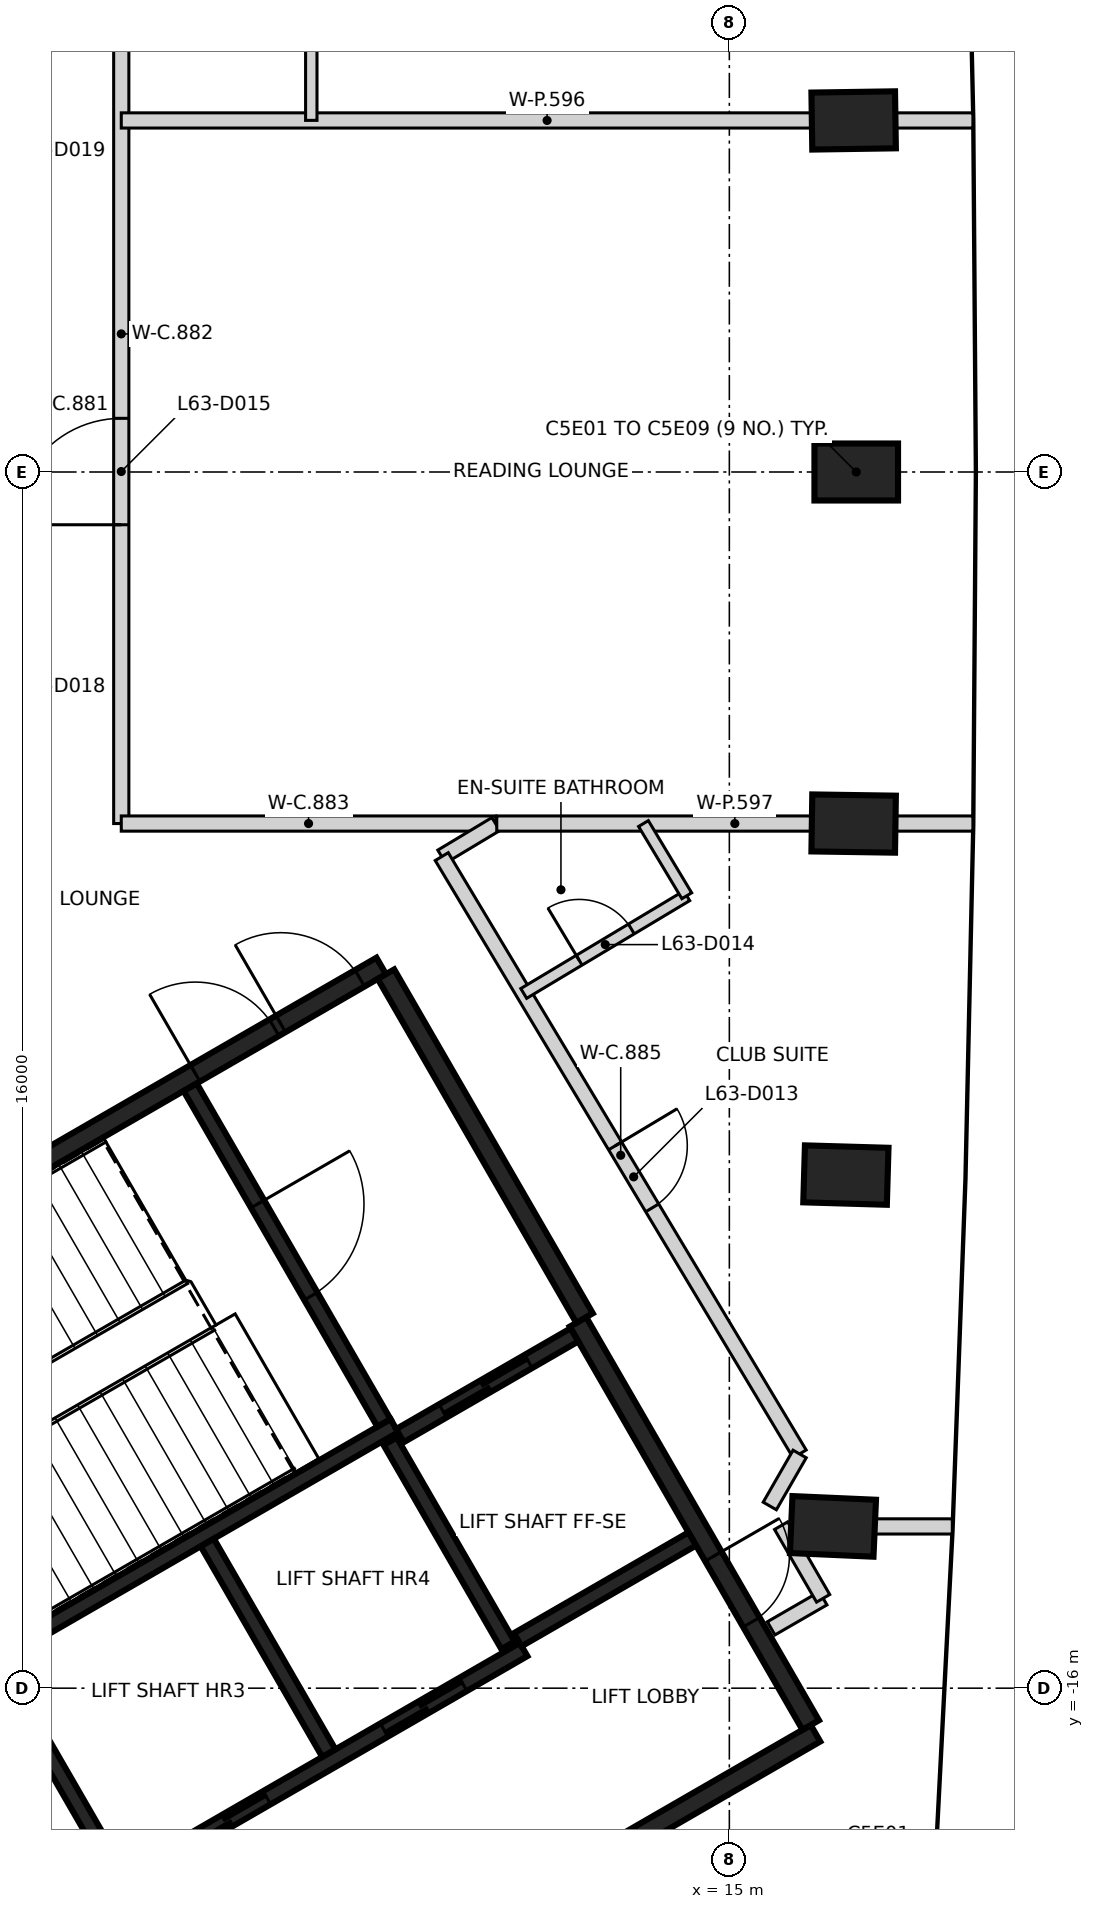
"""IFC4 building model, lengths in metres.
Left out: names, types, materials, properties, quantities, classifications, styles, units other than length and angle.
Written with IfcOpenShell. Run it as: python <this file> out.ifc"""

import sys

from ifc_helpers import new_model, si_unit, direction, frame, frame_2d, origin, origin_2d, place, context, subcontext, project, spatial, rectangle, extrude, element, fill, save


model = new_model("IFC4")
c1 = context("Model", 3, precision=1e-05, world=origin(), true_north=direction((0.0, 1.0)))
c2 = subcontext(c1, "Body", "Model", "MODEL_VIEW")
j1 = project(units=[si_unit("LENGTHUNIT", "METRE"), si_unit("PLANEANGLEUNIT", "RADIAN")], contexts=[c1])
p1 = place(None, origin())
s1 = spatial("IfcSite", under=j1, at=p1, CompositionType="ELEMENT")
p2 = place(p1, origin())
s2 = spatial("IfcBuilding", under=s1, at=p2, CompositionType="ELEMENT")
p3 = place(p2, frame((0.0, 0.0, 250.2)))
s3 = spatial("IfcBuildingStorey", under=s2, at=p3, CompositionType="ELEMENT", Elevation=250.2)
for number, where, z_axis, x_axis in (
    (1, (16.363, -13.872, -0.35), (0.0, 0.0, 1.0), (-0.999, 0.044, 0.0)),
    (2, (16.533, -9.25, -0.35), (0.0, 0.0, 1.0), (-1.0, 0.029, 0.0)),
    (3, (16.635, -4.625, -0.35), (0.0, 0.0, 1.0), (-1.0, 0.015, 0.0)),
    (4, (16.669, 0.0, -0.35), (0.0, 0.0, 1.0), (1.0, 0.0, 0.0)),
    (5, (16.635, 4.625, -0.35), (0.0, 0.0, 1.0), (1.0, 0.015, 0.0)),
):
    element("IfcColumn", number, at=place(p3, frame(where, z_axis=z_axis, x_axis=x_axis)), inside=s3, PredefinedType="COLUMN", context=c2, shape_type="SweptSolid", body=[
        extrude(rectangle(XDim=1.1, YDim=0.75, at=origin_2d()), origin(), (0.0, 0.0, 1.0), 3.6),
    ])
p4 = place(p3, frame((0.417, -12.273, 0.0), z_axis=(0.0, 0.0, 1.0), x_axis=(0.866021906294, 0.500006057782, 0.0)))
e6 = element("IfcWall", 6, at=p4, inside=s3, PredefinedType="SHEAR", context=c2, shape_type="SweptSolid", body=[
    extrude(rectangle(XDim=11.55, YDim=0.25, at=frame_2d((5.775, 0.0))), origin(), (0.0, 0.0, 1.0), 3.25),
])
p5 = place(p4, frame((10.025, 0.0, 0.0)))
e7 = element("IfcOpeningElement", 7, at=p5, cuts=e6, PredefinedType="OPENING", context=c2, shape_type="SweptSolid", body=[
    extrude(rectangle(XDim=1.2, YDim=2.1, at=frame_2d((0.6, 1.05))), frame((0.0, 0.135, 0.0), z_axis=(0.0, -1.0, 0.0), x_axis=(1.0, 0.0, 0.0)), (0.0, 0.0, 1.0), 0.27),
])
p6 = place(p4, frame((8.725, 0.0, 0.0)))
e8 = element("IfcOpeningElement", 8, at=p6, cuts=e6, PredefinedType="OPENING", context=c2, shape_type="SweptSolid", body=[
    extrude(rectangle(XDim=1.2, YDim=2.1, at=frame_2d((0.6, 1.05))), frame((0.0, 0.135, 0.0), z_axis=(0.0, -1.0, 0.0), x_axis=(1.0, 0.0, 0.0)), (0.0, 0.0, 1.0), 0.27),
])
p7 = place(p3, frame((16.133, -16.594, 0.0), z_axis=(0.0, 0.0, 1.0), x_axis=(-0.866022959057, -0.500004234368, 0.0)))
e9 = element("IfcWall", 9, at=p7, inside=s3, PredefinedType="SHEAR", context=c2, shape_type="SweptSolid", body=[
    extrude(rectangle(XDim=8.75, YDim=0.25, at=frame_2d((4.375, 0.0))), origin(), (0.0, 0.0, 1.0), 3.25),
])
p8 = place(p3, frame((13.008, -11.181, 0.0), z_axis=(0.0, 0.0, 1.0), x_axis=(0.500001955336, -0.866024274868, 0.0)))
e10 = element("IfcWall", 10, at=p8, inside=s3, PredefinedType="SHEAR", context=c2, shape_type="SweptSolid", body=[
    extrude(rectangle(XDim=6.125, YDim=0.25, at=frame_2d((3.062, 0.0))), origin(), (0.0, 0.0, 1.0), 3.25),
])
p9 = place(p8, frame((3.563, 0.0, 0.0)))
e11 = element("IfcOpeningElement", 11, at=p9, cuts=e10, PredefinedType="OPENING", context=c2, shape_type="SweptSolid", body=[
    extrude(rectangle(XDim=1.0, YDim=2.1, at=frame_2d((0.5, 1.05))), frame((0.0, 0.135, 0.0), z_axis=(0.0, -1.0, 0.0), x_axis=(1.0, 0.0, 0.0)), (0.0, 0.0, 1.0), 0.27),
])
p10 = place(p3, frame((10.483, -6.606, 0.0), z_axis=(0.0, 0.0, 1.0), x_axis=(0.49999885962, -0.866026062182, 0.0)))
e12 = element("IfcWall", 12, at=p10, inside=s3, PredefinedType="SHEAR", context=c2, shape_type="SweptSolid", body=[
    extrude(rectangle(XDim=5.225, YDim=0.25, at=frame_2d((2.612, 0.0))), origin(), (0.0, 0.0, 1.0), 3.25),
])
p11 = place(p3, frame((5.419, -15.534, 0.0), z_axis=(0.0, 0.0, 1.0), x_axis=(0.866029065029, 0.499993658486, 0.0)))
e13 = element("IfcWall", 13, at=p11, inside=s3, PredefinedType="SHEAR", context=c2, shape_type="SweptSolid", body=[
    extrude(rectangle(XDim=5.974, YDim=0.2, at=frame_2d((2.987, 0.0))), origin(), (0.0, 0.0, 1.0), 3.25),
])
p12 = place(p3, frame((7.01, -18.542, 0.0), z_axis=(0.0, 0.0, 1.0), x_axis=(0.866030299012, 0.499991521122, 0.0)))
e14 = element("IfcWall", 14, at=p12, inside=s3, PredefinedType="SHEAR", context=c2, shape_type="SweptSolid", body=[
    extrude(rectangle(XDim=6.1, YDim=0.2, at=frame_2d((3.05, 0.0))), origin(), (0.0, 0.0, 1.0), 3.25),
])
p13 = place(p12, frame((1.0, 0.0, 0.0)))
e15 = element("IfcOpeningElement", 15, at=p13, cuts=e14, PredefinedType="OPENING", context=c2, shape_type="SweptSolid", body=[
    extrude(rectangle(XDim=1.2, YDim=2.1, at=frame_2d((0.6, 1.05))), frame((0.0, 0.11, 0.0), z_axis=(0.0, -1.0, 0.0), x_axis=(1.0, 0.0, 0.0)), (0.0, 0.0, 1.0), 0.22),
])
p14 = place(p12, frame((3.982, 0.0, 0.0)))
e16 = element("IfcOpeningElement", 16, at=p14, cuts=e14, PredefinedType="OPENING", context=c2, shape_type="SweptSolid", body=[
    extrude(rectangle(XDim=1.2, YDim=2.1, at=frame_2d((0.6, 1.05))), frame((0.0, 0.11, 0.0), z_axis=(0.0, -1.0, 0.0), x_axis=(1.0, 0.0, 0.0)), (0.0, 0.0, 1.0), 0.22),
])
p15 = place(p3, frame((7.906, -8.094, 0.0), z_axis=(0.0, 0.0, 1.0), x_axis=(0.500027839223, -0.866009330205, 0.0)))
e17 = element("IfcWall", 17, at=p15, inside=s3, PredefinedType="SHEAR", context=c2, shape_type="SweptSolid", body=[
    extrude(rectangle(XDim=5.098, YDim=0.2, at=frame_2d((2.549, 0.0))), origin(), (0.0, 0.0, 1.0), 3.25),
])
p16 = place(p15, frame((1.774, 0.0, 0.0)))
e18 = element("IfcOpeningElement", 18, at=p16, cuts=e17, PredefinedType="OPENING", context=c2, shape_type="SweptSolid", body=[
    extrude(rectangle(XDim=1.4, YDim=2.1, at=frame_2d((0.7, 1.05))), frame((0.0, 0.11, 0.0), z_axis=(0.0, -1.0, 0.0), x_axis=(1.0, 0.0, 0.0)), (0.0, 0.0, 1.0), 0.22),
])
p17 = place(p3, frame((8.132, -14.084, 0.0), z_axis=(0.0, 0.0, 1.0), x_axis=(0.499997778408, -0.866026686418, 0.0)))
e19 = element("IfcWall", 19, at=p17, inside=s3, PredefinedType="SHEAR", context=c2, shape_type="SweptSolid", body=[
    extrude(rectangle(XDim=3.198, YDim=0.2, at=frame_2d((1.599, 0.0))), origin(), (0.0, 0.0, 1.0), 3.25),
])
p18 = place(p3, frame((6.96, -18.455, 0.0), z_axis=(0.0, 0.0, 1.0), x_axis=(-0.499926705758, 0.866067716099, 0.0)))
e20 = element("IfcWall", 20, at=p18, inside=s3, PredefinedType="SHEAR", context=c2, shape_type="SweptSolid", body=[
    extrude(rectangle(XDim=2.759, YDim=0.2, at=frame_2d((1.38, 0.0))), origin(), (0.0, 0.0, 1.0), 3.25),
])
p19 = place(p3, frame((12.088, -15.437, 0.0), z_axis=(0.0, 0.0, 1.0), x_axis=(-0.500026960575, 0.86600983753, 0.0)))
e21 = element("IfcWall", 21, at=p19, inside=s3, PredefinedType="SHEAR", context=c2, shape_type="SweptSolid", body=[
    extrude(rectangle(XDim=3.1, YDim=0.2, at=frame_2d((1.55, 0.0))), origin(), (0.0, 0.0, 1.0), 3.25),
])
p20 = place(p3, frame((10.666, -12.678, 0.0), z_axis=(0.0, 0.0, 1.0), x_axis=(0.866018407898, 0.500012117035, 0.0)))
e22 = element("IfcWall", 22, at=p20, inside=s3, PredefinedType="SHEAR", context=c2, shape_type="SweptSolid", body=[
    extrude(rectangle(XDim=2.651, YDim=0.2, at=frame_2d((1.325, 0.0))), origin(), (0.0, 0.0, 1.0), 3.25),
])
p21 = place(p20, frame((0.652, 0.0, 0.0)))
e23 = element("IfcOpeningElement", 23, at=p21, cuts=e22, PredefinedType="OPENING", context=c2, shape_type="SweptSolid", body=[
    extrude(rectangle(XDim=1.3, YDim=2.1, at=frame_2d((0.65, 1.05))), frame((0.0, 0.11, 0.0), z_axis=(0.0, -1.0, 0.0), x_axis=(1.0, 0.0, 0.0)), (0.0, 0.0, 1.0), 0.22),
])
p22 = place(p3, frame((14.512, -14.037, 0.0), z_axis=(0.0, 0.0, 1.0), x_axis=(-0.866018407898, -0.500012117035, 0.0)))
e24 = element("IfcWall", 24, at=p22, inside=s3, PredefinedType="SHEAR", context=c2, shape_type="SweptSolid", body=[
    extrude(rectangle(XDim=2.651, YDim=0.2, at=frame_2d((1.325, 0.0))), origin(), (0.0, 0.0, 1.0), 3.25),
])
p23 = place(p3, frame((7.0, -4.625, 0.0), z_axis=(0.0, 0.0, 1.0), x_axis=(0.0, 1.0, 0.0)))
e25 = element("IfcWall", 25, at=p23, inside=s3, PredefinedType="PARTITIONING", context=c2, shape_type="SweptSolid", body=[
    extrude(rectangle(XDim=12.884, YDim=0.2, at=frame_2d((6.442, 0.0))), origin(), (0.0, 0.0, 1.0), 3.25),
])
p24 = place(p23, frame((3.931, 0.0, 0.0)))
e26 = element("IfcOpeningElement", 26, at=p24, cuts=e25, PredefinedType="OPENING", context=c2, shape_type="SweptSolid", body=[
    extrude(rectangle(XDim=1.4, YDim=2.1, at=frame_2d((0.7, 1.05))), frame((0.0, 0.11, 0.0), z_axis=(0.0, -1.0, 0.0), x_axis=(1.0, 0.0, 0.0)), (0.0, 0.0, 1.0), 0.22),
])
p25 = place(p23, frame((11.777, 0.0, 0.0)))
e27 = element("IfcOpeningElement", 27, at=p25, cuts=e25, PredefinedType="OPENING", context=c2, shape_type="SweptSolid", body=[
    extrude(rectangle(XDim=0.95, YDim=2.1, at=frame_2d((0.475, 1.05))), frame((0.0, 0.11, 0.0), z_axis=(0.0, -1.0, 0.0), x_axis=(1.0, 0.0, 0.0)), (0.0, 0.0, 1.0), 0.22),
])
p26 = place(p3, frame((7.0, -4.625, 0.0), z_axis=(0.0, 0.0, 1.0), x_axis=(1.0, 0.0, 0.0)))
e28 = element("IfcWall", 28, at=p26, inside=s3, PredefinedType="PARTITIONING", context=c2, shape_type="SweptSolid", body=[
    extrude(rectangle(XDim=4.928, YDim=0.2, at=frame_2d((2.464, 0.0))), origin(), (0.0, 0.0, 1.0), 3.25),
])
p27 = place(p3, frame((11.216, -5.06, 0.0), z_axis=(0.0, 0.0, 1.0), x_axis=(0.857051740658, 0.515230350265, 0.0)))
e29 = element("IfcWall", 29, at=p27, inside=s3, PredefinedType="PARTITIONING", context=c2, shape_type="SweptSolid", body=[
    extrude(rectangle(XDim=0.831, YDim=0.2, at=frame_2d((0.415, 0.0))), origin(), (0.0, 0.0, 1.0), 3.25),
])
p28 = place(p3, frame((11.216, -5.06, 0.0), z_axis=(0.0, 0.0, 1.0), x_axis=(0.514001858113, -0.857789070726, 0.0)))
e30 = element("IfcWall", 30, at=p28, inside=s3, PredefinedType="PARTITIONING", context=c2, shape_type="SweptSolid", body=[
    extrude(rectangle(XDim=9.161, YDim=0.2, at=frame_2d((4.581, 0.0))), origin(), (0.0, 0.0, 1.0), 3.25),
])
p29 = place(p28, frame((4.437, 0.0, 0.0)))
e31 = element("IfcOpeningElement", 31, at=p29, cuts=e30, PredefinedType="OPENING", context=c2, shape_type="SweptSolid", body=[
    extrude(rectangle(XDim=0.95, YDim=2.1, at=frame_2d((0.475, 1.05))), frame((0.0, 0.11, 0.0), z_axis=(0.0, -1.0, 0.0), x_axis=(1.0, 0.0, 0.0)), (0.0, 0.0, 1.0), 0.22),
])
p30 = place(p3, frame((15.55, -15.213, 0.0), z_axis=(0.0, 0.0, 1.0), x_axis=(0.865989998118, 0.500061319399, 0.0)))
e32 = element("IfcWall", 32, at=p30, inside=s3, PredefinedType="PARTITIONING", context=c2, shape_type="SweptSolid", body=[
    extrude(rectangle(XDim=0.79, YDim=0.2, at=frame_2d((0.395, 0.0))), origin(), (0.0, 0.0, 1.0), 2.35),
])
p31 = place(p3, frame((15.532, -13.603, 0.0), z_axis=(0.0, 0.0, 1.0), x_axis=(0.498203662485, 0.867060038686, 0.0)))
e33 = element("IfcWall", 33, at=p31, inside=s3, PredefinedType="PARTITIONING", context=c2, shape_type="SweptSolid", body=[
    extrude(rectangle(XDim=0.789, YDim=0.2, at=frame_2d((0.395, 0.0))), origin(), (0.0, 0.0, 1.0), 3.25),
])
p32 = place(p3, frame((15.681, -13.862, 0.0), z_axis=(0.0, 0.0, 1.0), x_axis=(0.500678970179, -0.86563304513, 0.0)))
e34 = element("IfcWall", 34, at=p32, inside=s3, PredefinedType="PARTITIONING", context=c2, shape_type="SweptSolid", body=[
    extrude(rectangle(XDim=1.104, YDim=0.2, at=frame_2d((0.552, 0.0))), origin(), (0.0, 0.0, 1.0), 2.35),
])
p33 = place(p3, frame((7.0, 4.625, 0.0), z_axis=(0.0, 0.0, 1.0), x_axis=(1.0, 0.0, 0.0)))
e35 = element("IfcWall", 35, at=p33, inside=s3, PredefinedType="PARTITIONING", context=c2, shape_type="SweptSolid", body=[
    extrude(rectangle(XDim=11.204, YDim=0.2, at=frame_2d((5.602, 0.0))), origin(), (0.0, 0.0, 1.0), 3.25),
])
p34 = place(p3, frame((11.94, -4.625, 0.0), z_axis=(0.0, 0.0, 1.0), x_axis=(1.0, 0.0, 0.0)))
e36 = element("IfcWall", 36, at=p34, inside=s3, PredefinedType="PARTITIONING", context=c2, shape_type="SweptSolid", body=[
    extrude(rectangle(XDim=6.264, YDim=0.2, at=frame_2d((3.132, 0.0))), origin(), (0.0, 0.0, 1.0), 3.25),
])
p35 = place(p3, frame((17.933, -13.872, 0.0), z_axis=(0.0, 0.0, 1.0), x_axis=(-1.0, 0.0, 0.0)))
e37 = element("IfcWall", 37, at=p35, inside=s3, PredefinedType="PARTITIONING", context=c2, shape_type="SweptSolid", body=[
    extrude(rectangle(XDim=1.899, YDim=0.2, at=frame_2d((0.95, 0.0))), origin(), (0.0, 0.0, 1.0), 3.25),
])
p36 = place(p3, frame((9.5, 4.626, 0.0), z_axis=(0.0, 0.0, 1.0), x_axis=(0.0, 1.0, 0.0)))
e38 = element("IfcWall", 38, at=p36, inside=s3, PredefinedType="PARTITIONING", context=c2, shape_type="SweptSolid", body=[
    extrude(rectangle(XDim=2.097, YDim=0.15, at=frame_2d((1.048, 0.0))), origin(), (0.0, 0.0, 1.0), 3.25),
])
p37 = place(p3, frame((12.295, -6.86, 0.0), z_axis=(0.0, 0.0, 1.0), x_axis=(0.857820116165, 0.513950044559, 0.0)))
e39 = element("IfcWall", 39, at=p37, inside=s3, PredefinedType="PARTITIONING", context=c2, shape_type="SweptSolid", body=[
    extrude(rectangle(XDim=2.5, YDim=0.15, at=frame_2d((1.25, 0.0))), origin(), (0.0, 0.0, 1.0), 3.25),
])
p38 = place(p37, frame((0.85, 0.0, 0.0)))
e40 = element("IfcOpeningElement", 40, at=p38, cuts=e39, PredefinedType="OPENING", context=c2, shape_type="SweptSolid", body=[
    extrude(rectangle(XDim=0.8, YDim=2.1, at=frame_2d((0.4, 1.05))), frame((0.0, 0.085, 0.0), z_axis=(0.0, -1.0, 0.0), x_axis=(1.0, 0.0, 0.0)), (0.0, 0.0, 1.0), 0.17),
])
p39 = place(p3, frame((13.87, -4.625, 0.0), z_axis=(0.0, 0.0, 1.0), x_axis=(0.514398519676, -0.857551259666, 0.0)))
e41 = element("IfcWall", 41, at=p39, inside=s3, PredefinedType="PARTITIONING", context=c2, shape_type="SweptSolid", body=[
    extrude(rectangle(XDim=1.108, YDim=0.15, at=frame_2d((0.554, 0.0))), origin(), (0.0, 0.0, 1.0), 3.25),
])
p40 = place(p21, origin())
e42 = element("IfcDoor", 42, at=p40, inside=s3, OperationType="SLIDING_TO_LEFT", PredefinedType="DOOR", context=c2, shape_type="SweptSolid", body=[
    extrude(rectangle(XDim=1.3, YDim=2.1, at=frame_2d((0.65, 1.05))), frame((0.0, 0.025, 0.0), z_axis=(0.0, -1.0, 0.0), x_axis=(1.0, 0.0, 0.0)), (0.0, 0.0, 1.0), 0.05),
])
fill(e23, e42)
p41 = place(p13, origin())
e43 = element("IfcDoor", 43, at=p41, inside=s3, OperationType="DOUBLE_DOOR_SLIDING", PredefinedType="DOOR", context=c2, shape_type="SweptSolid", body=[
    extrude(rectangle(XDim=1.2, YDim=2.1, at=frame_2d((0.6, 1.05))), frame((0.0, 0.025, 0.0), z_axis=(0.0, -1.0, 0.0), x_axis=(1.0, 0.0, 0.0)), (0.0, 0.0, 1.0), 0.05),
])
fill(e15, e43)
p42 = place(p14, origin())
e44 = element("IfcDoor", 44, at=p42, inside=s3, OperationType="DOUBLE_DOOR_SLIDING", PredefinedType="DOOR", context=c2, shape_type="SweptSolid", body=[
    extrude(rectangle(XDim=1.2, YDim=2.1, at=frame_2d((0.6, 1.05))), frame((0.0, 0.025, 0.0), z_axis=(0.0, -1.0, 0.0), x_axis=(1.0, 0.0, 0.0)), (0.0, 0.0, 1.0), 0.05),
])
fill(e16, e44)
p43 = place(p9, origin())
e45 = element("IfcDoor", 45, at=p43, inside=s3, OperationType="SINGLE_SWING_LEFT", PredefinedType="DOOR", context=c2, shape_type="SweptSolid", body=[
    extrude(rectangle(XDim=1.0, YDim=2.1, at=frame_2d((0.5, 1.05))), frame((0.0, 0.025, 0.0), z_axis=(0.0, -1.0, 0.0), x_axis=(1.0, 0.0, 0.0)), (0.0, 0.0, 1.0), 0.05),
])
fill(e11, e45)
p44 = place(p5, origin())
e46 = element("IfcDoor", 46, at=p44, inside=s3, OperationType="SINGLE_SWING_LEFT", PredefinedType="DOOR", context=c2, shape_type="SweptSolid", body=[
    extrude(rectangle(XDim=1.2, YDim=2.1, at=frame_2d((0.6, 1.05))), frame((0.0, 0.025, 0.0), z_axis=(0.0, -1.0, 0.0), x_axis=(1.0, 0.0, 0.0)), (0.0, 0.0, 1.0), 0.05),
])
fill(e7, e46)
p45 = place(p6, origin())
e47 = element("IfcDoor", 47, at=p45, inside=s3, OperationType="SINGLE_SWING_RIGHT", PredefinedType="DOOR", context=c2, shape_type="SweptSolid", body=[
    extrude(rectangle(XDim=1.2, YDim=2.1, at=frame_2d((0.6, 1.05))), frame((0.0, 0.025, 0.0), z_axis=(0.0, -1.0, 0.0), x_axis=(1.0, 0.0, 0.0)), (0.0, 0.0, 1.0), 0.05),
])
fill(e8, e47)
p46 = place(p16, origin())
e48 = element("IfcDoor", 48, at=p46, inside=s3, OperationType="SINGLE_SWING_LEFT", PredefinedType="DOOR", context=c2, shape_type="SweptSolid", body=[
    extrude(rectangle(XDim=1.4, YDim=2.1, at=frame_2d((0.7, 1.05))), frame((0.0, 0.025, 0.0), z_axis=(0.0, -1.0, 0.0), x_axis=(1.0, 0.0, 0.0)), (0.0, 0.0, 1.0), 0.05),
])
fill(e18, e48)
p47 = place(p29, origin())
e49 = element("IfcDoor", 49, at=p47, inside=s3, OperationType="SINGLE_SWING_LEFT", PredefinedType="DOOR", context=c2, shape_type="SweptSolid", body=[
    extrude(rectangle(XDim=0.95, YDim=2.1, at=frame_2d((0.475, 1.05))), frame((0.0, 0.025, 0.0), z_axis=(0.0, -1.0, 0.0), x_axis=(1.0, 0.0, 0.0)), (0.0, 0.0, 1.0), 0.05),
])
fill(e31, e49)
p48 = place(p38, frame((0.8, 0.0, 0.0), z_axis=(0.0, 0.0, 1.0), x_axis=(-1.0, 0.0, 0.0)))
e50 = element("IfcDoor", 50, at=p48, inside=s3, OperationType="SINGLE_SWING_LEFT", PredefinedType="DOOR", context=c2, shape_type="SweptSolid", body=[
    extrude(rectangle(XDim=0.8, YDim=2.1, at=frame_2d((0.4, 1.05))), frame((0.0, 0.025, 0.0), z_axis=(0.0, -1.0, 0.0), x_axis=(1.0, 0.0, 0.0)), (0.0, 0.0, 1.0), 0.05),
])
fill(e40, e50)
p49 = place(p24, frame((1.4, 0.0, 0.0), z_axis=(0.0, 0.0, 1.0), x_axis=(-1.0, 0.0, 0.0)))
e51 = element("IfcDoor", 51, at=p49, inside=s3, OperationType="DOUBLE_DOOR_SINGLE_SWING", PredefinedType="DOOR", context=c2, shape_type="SweptSolid", body=[
    extrude(rectangle(XDim=1.4, YDim=2.1, at=frame_2d((0.7, 1.05))), frame((0.0, 0.025, 0.0), z_axis=(0.0, -1.0, 0.0), x_axis=(1.0, 0.0, 0.0)), (0.0, 0.0, 1.0), 0.05),
])
fill(e26, e51)
save(model, sys.argv[1])
